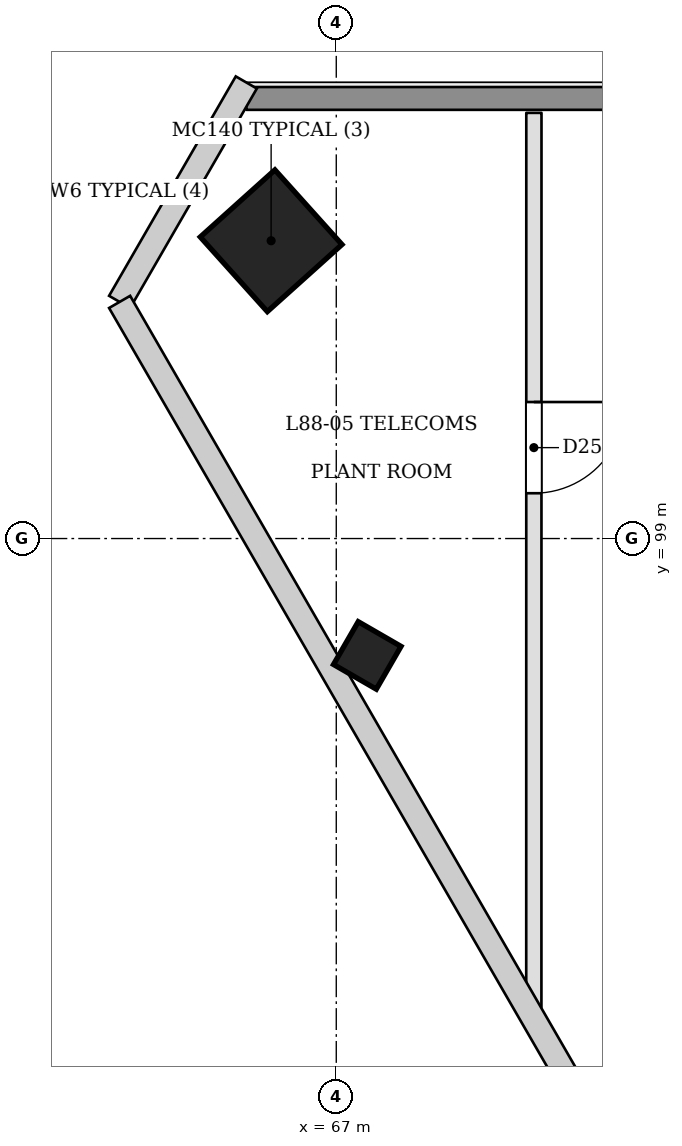
"""IFC4 building model, lengths in metres.
Left out: names, types, materials, properties, quantities, classifications, styles, units other than length and angle.
Written with IfcOpenShell. Run it as: python <this file> out.ifc"""

import sys

from ifc_helpers import new_model, si_unit, direction, frame, frame_2d, origin, origin_2d, place, context, subcontext, project, spatial, rectangle, extrude, element, fill, save


model = new_model("IFC4")
c1 = context("Model", 3, precision=1e-05, world=origin(), true_north=direction((0.0, 1.0)))
c2 = subcontext(c1, "Body", "Model", "MODEL_VIEW")
j1 = project(units=[si_unit("LENGTHUNIT", "METRE"), si_unit("PLANEANGLEUNIT", "RADIAN")], contexts=[c1])
p1 = place(None, origin())
s1 = spatial("IfcSite", under=j1, at=p1, CompositionType="ELEMENT")
p2 = place(p1, origin())
s2 = spatial("IfcBuilding", under=s1, at=p2, CompositionType="ELEMENT")
p3 = place(p2, frame((0.0, 0.0, 338.8)))
s3 = spatial("IfcBuildingStorey", under=s2, at=p3, CompositionType="ELEMENT", Elevation=338.8)
p4 = place(p3, frame((66.109, 102.906, 0.0), z_axis=(0.028412585289, 0.009238447977, 0.999553588396), x_axis=(-0.865379574523, 0.500718845558, 0.019970721124)))
e1 = element("IfcColumn", 1, at=p4, inside=s3, PredefinedType="COLUMN", context=c2, shape_type="SweptSolid", body=[
    extrude(rectangle(XDim=1.32, YDim=1.32, at=origin_2d()), origin(), (0.0, 0.0, 1.0), 4.202),
])
p5 = place(p3, frame((67.381, 97.415, -0.02), z_axis=(0.022252955841, 0.038436923726, 0.999013217556), x_axis=(-0.866196439405, -0.498221125167, 0.038463473583)))
e2 = element("IfcColumn", 2, at=p5, inside=s3, PredefinedType="COLUMN", context=c2, shape_type="SweptSolid", body=[
    extrude(rectangle(XDim=0.65, YDim=0.65, at=origin_2d()), origin(), (0.0, 0.0, 1.0), 4.224),
])
p6 = place(p3, frame((69.6, 104.6, 0.0), z_axis=(0.0, 0.0, 1.0), x_axis=(-8.3001328e-05, -0.999999996555, 0.0)))
e3 = element("IfcWall", 3, at=p6, inside=s3, PredefinedType="PARTITIONING", context=c2, shape_type="SweptSolid", body=[
    extrude(rectangle(XDim=11.766, YDim=0.2, at=frame_2d((5.883, 0.0))), origin(), (0.0, 0.0, 1.0), 3.9),
])
p7 = place(p6, frame((3.804, 0.0, 0.0)))
e4 = element("IfcOpeningElement", 4, at=p7, cuts=e3, PredefinedType="OPENING", context=c2, shape_type="SweptSolid", body=[
    extrude(rectangle(XDim=1.2, YDim=2.4, at=frame_2d((0.6, 1.2))), frame((0.0, 0.11, 0.0), z_axis=(0.0, -1.0, 0.0), x_axis=(1.0, 0.0, 0.0)), (0.0, 0.0, 1.0), 0.221),
])
p8 = place(p3, frame((65.816, 104.79, 0.0), z_axis=(0.0, 0.0, 1.0), x_axis=(1.0, 0.0, 0.0)))
e5 = element("IfcWall", 5, at=p8, inside=s3, PredefinedType="SOLIDWALL", context=c2, shape_type="SweptSolid", body=[
    extrude(rectangle(XDim=38.367, YDim=0.3, at=frame_2d((19.184, 0.0))), origin(), (0.0, 0.0, 1.0), 3.9),
])
p9 = place(p7, origin())
e6 = element("IfcDoor", 6, at=p9, inside=s3, OperationType="SINGLE_SWING_LEFT", PredefinedType="NOTDEFINED", context=c2, shape_type="SweptSolid", body=[
    extrude(rectangle(XDim=1.2, YDim=2.4, at=frame_2d((0.6, 1.2))), frame((0.0, 0.025, 0.0), z_axis=(0.0, -1.0, 0.0), x_axis=(1.0, 0.0, 0.0)), (0.0, 0.0, 1.0), 0.05),
])
fill(e4, e6)
save(model, sys.argv[1])
